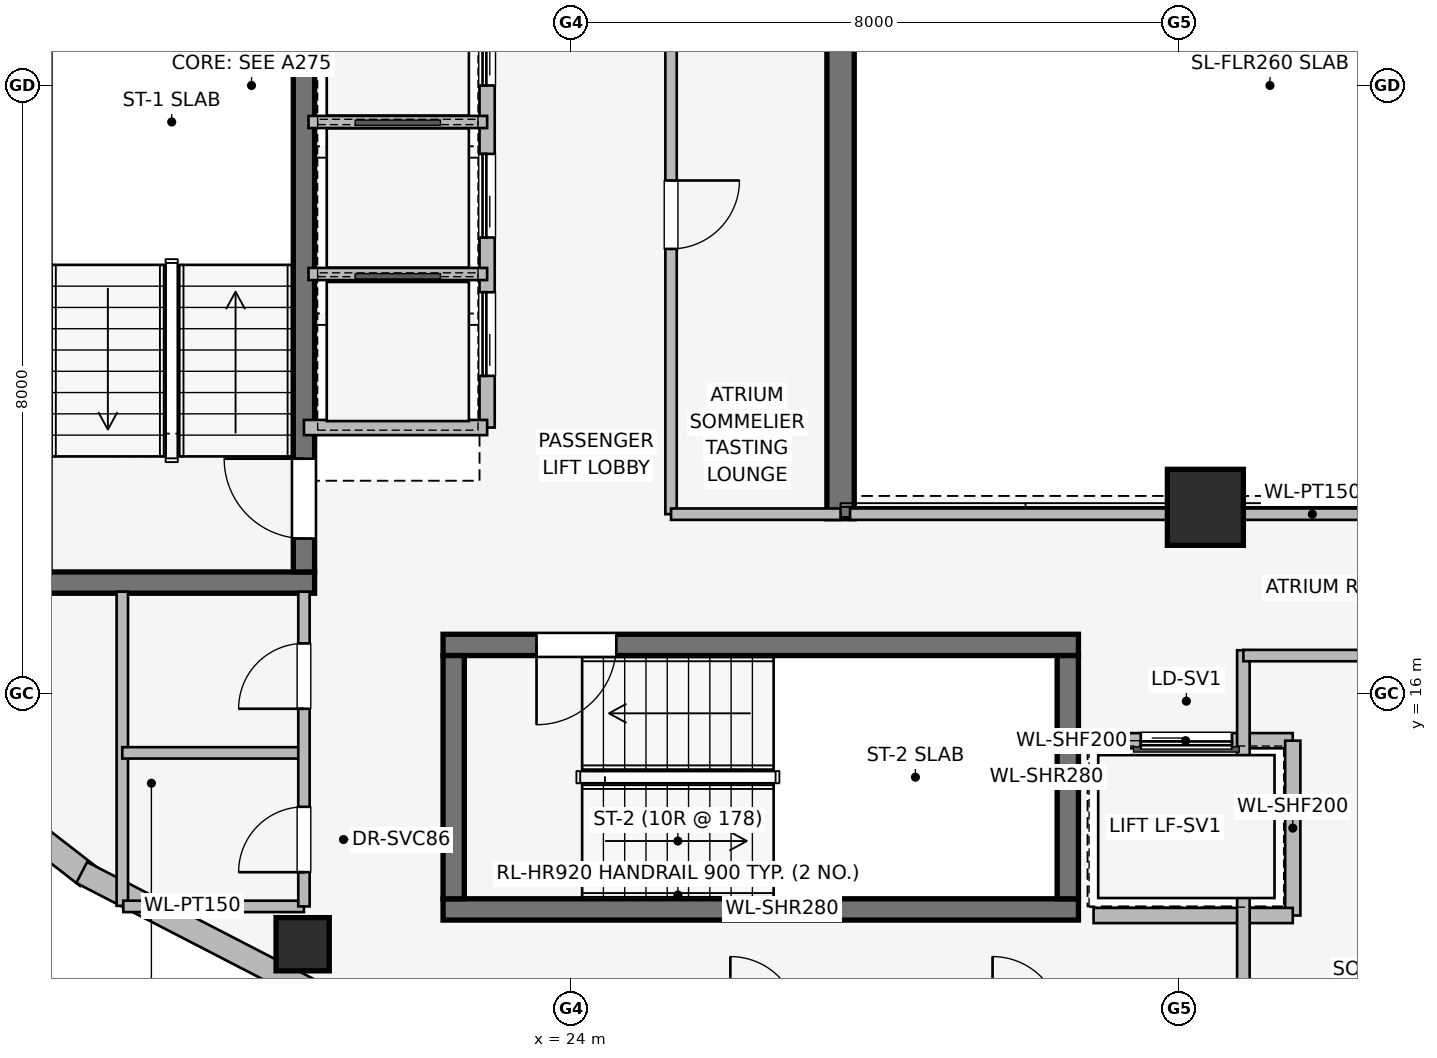
"""IFC4 building model, lengths in metres.
Left out: names, types, materials, properties, quantities, classifications, styles, units other than length and angle.
Written with IfcOpenShell. Run it as: python <this file> out.ifc"""

import sys

from ifc_helpers import new_model, si_unit, direction, frame, frame_2d, origin, origin_2d, place, context, subcontext, project, spatial, rectangle, extrude, element, fill, save


model = new_model("IFC4")
c1 = context("Model", 3, precision=1e-05, world=origin(), true_north=direction((0.0, 1.0)))
c2 = subcontext(c1, "Body", "Model", "MODEL_VIEW")
j1 = project(units=[si_unit("LENGTHUNIT", "METRE"), si_unit("PLANEANGLEUNIT", "RADIAN")], contexts=[c1])
p1 = place(None, origin())
s1 = spatial("IfcSite", under=j1, at=p1, CompositionType="ELEMENT")
p2 = place(p1, origin())
s2 = spatial("IfcBuilding", under=s1, at=p2, CompositionType="ELEMENT")
p3 = place(p2, frame((0.0, 0.0, 266.75)))
s3 = spatial("IfcBuildingStorey", under=s2, at=p3, CompositionType="ELEMENT", Elevation=266.75)
p4 = place(p3, frame((27.55, 29.55, 0.0), z_axis=(0.0, 0.0, 1.0), x_axis=(0.0, -1.0, 0.0)))
e1 = element("IfcWall", 1, at=p4, inside=s3, PredefinedType="SHEAR", context=c2, shape_type="SweptSolid", body=[
    extrude(rectangle(XDim=11.25, YDim=0.36, at=frame_2d((5.625, 0.0))), origin(), (0.0, 0.0, 1.0), 3.55),
])
p5 = place(p3, frame((16.87, 17.46, 0.0), z_axis=(0.0, 0.0, 1.0), x_axis=(1.0, 0.0, 0.0)))
e2 = element("IfcWall", 2, at=p5, inside=s3, PredefinedType="SHEAR", context=c2, shape_type="SweptSolid", body=[
    extrude(rectangle(XDim=3.76, YDim=0.28, at=frame_2d((1.88, 0.0))), origin(), (0.0, 0.0, 1.0), 3.55),
])
p6 = place(p3, frame((20.49, 17.6, 0.0), z_axis=(0.0, 0.0, 1.0), x_axis=(0.0, 1.0, 0.0)))
e3 = element("IfcWall", 3, at=p6, inside=s3, PredefinedType="SHEAR", context=c2, shape_type="SweptSolid", body=[
    extrude(rectangle(XDim=7.8, YDim=0.28, at=frame_2d((3.9, 0.0))), origin(), (0.0, 0.0, 1.0), 3.55),
])
p7 = place(p6, frame((0.44, 0.0, 0.0)))
e4 = element("IfcOpeningElement", 4, at=p7, cuts=e3, PredefinedType="OPENING", context=c2, shape_type="SweptSolid", body=[
    extrude(rectangle(XDim=1.05, YDim=2.0, at=frame_2d((0.525, 1.0))), frame((0.0, 0.15, 0.0), z_axis=(0.0, -1.0, 0.0), x_axis=(1.0, 0.0, 0.0)), (0.0, 0.0, 1.0), 0.3),
])
p8 = place(p3, frame((22.32, 13.16, 0.0), z_axis=(0.0, 0.0, 1.0), x_axis=(1.0, 0.0, 0.0)))
e5 = element("IfcWall", 5, at=p8, inside=s3, PredefinedType="SHEAR", context=c2, shape_type="SweptSolid", body=[
    extrude(rectangle(XDim=8.36, YDim=0.28, at=frame_2d((4.18, 0.0))), origin(), (0.0, 0.0, 1.0), 3.55),
])
p9 = place(p3, frame((30.68, 16.64, 0.0), z_axis=(0.0, 0.0, 1.0), x_axis=(-1.0, 0.0, 0.0)))
e6 = element("IfcWall", 6, at=p9, inside=s3, PredefinedType="SHEAR", context=c2, shape_type="SweptSolid", body=[
    extrude(rectangle(XDim=8.36, YDim=0.28, at=frame_2d((4.18, 0.0))), origin(), (0.0, 0.0, 1.0), 3.55),
])
p10 = place(p9, frame((6.08, 0.0, 0.0)))
e7 = element("IfcOpeningElement", 7, at=p10, cuts=e6, PredefinedType="OPENING", context=c2, shape_type="SweptSolid", body=[
    extrude(rectangle(XDim=1.05, YDim=2.0, at=frame_2d((0.525, 1.0))), frame((0.0, 0.15, 0.0), z_axis=(0.0, -1.0, 0.0), x_axis=(1.0, 0.0, 0.0)), (0.0, 0.0, 1.0), 0.3),
])
for number, where, z_axis, x_axis in (
    (8, (22.46, 16.5, 0.0), (0.0, 0.0, 1.0), (0.0, -1.0, 0.0)),
    (9, (30.54, 13.3, 0.0), (0.0, 0.0, 1.0), (0.0, 1.0, 0.0)),
):
    element("IfcWall", number, at=place(p3, frame(where, z_axis=z_axis, x_axis=x_axis)), inside=s3, PredefinedType="SHEAR", context=c2, shape_type="SweptSolid", body=[
        extrude(rectangle(XDim=3.2, YDim=0.28, at=frame_2d((1.6, 0.0))), origin(), (0.0, 0.0, 1.0), 3.55),
    ])
p11 = place(p3, frame((32.35, 18.45, 0.0), z_axis=(0.0, 0.0, 1.0), x_axis=(1.0, 0.0, 0.0)))
e10 = element("IfcColumn", 10, at=p11, inside=s3, PredefinedType="COLUMN", context=c2, shape_type="SweptSolid", body=[
    extrude(rectangle(XDim=1.0, YDim=1.0, at=origin_2d()), origin(), (0.0, 0.0, 1.0), 3.55),
])
p12 = place(p3, frame((20.473, 12.702, 0.0), z_axis=(0.0, 0.0, 1.0), x_axis=(1.0, 0.0, 0.0)))
e11 = element("IfcColumn", 11, at=p12, inside=s3, PredefinedType="COLUMN", context=c2, shape_type="SweptSolid", body=[
    extrude(rectangle(XDim=0.7, YDim=0.7, at=origin_2d()), origin(), (0.0, 0.0, 1.0), 3.55),
])
p13 = place(p3, frame((17.647, 13.599, 0.0), z_axis=(0.0, 0.0, 1.0), x_axis=(-0.790691856293, 0.61221433207, 0.0)))
e12 = element("IfcWall", 12, at=p13, inside=s3, PredefinedType="STANDARD", context=c2, shape_type="SweptSolid", body=[
    extrude(rectangle(XDim=1.676, YDim=0.33, at=frame_2d((0.838, 0.0))), origin(), (0.0, 0.0, 1.0), 3.24),
])
p14 = place(p3, frame((30.963, 6.73, 0.0), z_axis=(0.0, 0.0, 1.0), x_axis=(-0.888581481622, 0.458718814218, 0.0)))
e13 = element("IfcWall", 13, at=p14, inside=s3, PredefinedType="STANDARD", context=c2, shape_type="SweptSolid", body=[
    extrude(rectangle(XDim=15.077, YDim=0.31, at=frame_2d((7.539, 0.0))), origin(), (0.0, 0.0, 1.0), 3.24),
])
p15 = place(p14, frame((0.998, 0.0, 0.75)))
e14 = element("IfcOpeningElement", 14, at=p15, cuts=e13, PredefinedType="OPENING", context=c2, shape_type="SweptSolid", body=[
    extrude(rectangle(XDim=1.05, YDim=1.4, at=frame_2d((0.525, 0.7))), frame((0.0, 0.165, 0.0), z_axis=(0.0, -1.0, 0.0), x_axis=(1.0, 0.0, 0.0)), (0.0, 0.0, 1.0), 0.33),
])
p16 = place(p14, frame((4.176, 0.0, 0.75)))
e15 = element("IfcOpeningElement", 15, at=p16, cuts=e13, PredefinedType="OPENING", context=c2, shape_type="SweptSolid", body=[
    extrude(rectangle(XDim=1.05, YDim=1.4, at=frame_2d((0.525, 0.7))), frame((0.0, 0.165, 0.0), z_axis=(0.0, -1.0, 0.0), x_axis=(1.0, 0.0, 0.0)), (0.0, 0.0, 1.0), 0.33),
])
p17 = place(p14, frame((6.509, 0.0, 0.75)))
e16 = element("IfcOpeningElement", 16, at=p17, cuts=e13, PredefinedType="OPENING", context=c2, shape_type="SweptSolid", body=[
    extrude(rectangle(XDim=1.05, YDim=1.4, at=frame_2d((0.525, 0.7))), frame((0.0, 0.165, 0.0), z_axis=(0.0, -1.0, 0.0), x_axis=(1.0, 0.0, 0.0)), (0.0, 0.0, 1.0), 0.33),
])
p18 = place(p14, frame((8.842, 0.0, 0.75)))
e17 = element("IfcOpeningElement", 17, at=p18, cuts=e13, PredefinedType="OPENING", context=c2, shape_type="SweptSolid", body=[
    extrude(rectangle(XDim=1.05, YDim=1.4, at=frame_2d((0.525, 0.7))), frame((0.0, 0.165, 0.0), z_axis=(0.0, -1.0, 0.0), x_axis=(1.0, 0.0, 0.0)), (0.0, 0.0, 1.0), 0.33),
])
p19 = place(p3, frame((33.5, 15.38, 0.0), z_axis=(0.0, 0.0, 1.0), x_axis=(-1.0, 0.0, 0.0)))
e18 = element("IfcWall", 18, at=p19, inside=s3, PredefinedType="PARTITIONING", context=c2, shape_type="SweptSolid", body=[
    extrude(rectangle(XDim=2.82, YDim=0.2, at=frame_2d((1.41, 0.0))), origin(), (0.0, 0.0, 1.0), 3.24),
])
p20 = place(p19, frame((0.8, 0.0, 0.0)))
e19 = element("IfcOpeningElement", 19, at=p20, cuts=e18, PredefinedType="OPENING", context=c2, shape_type="SweptSolid", body=[
    extrude(rectangle(XDim=1.2, YDim=2.2, at=frame_2d((0.6, 1.1))), frame((0.0, 0.11, 0.0), z_axis=(0.0, -1.0, 0.0), x_axis=(1.0, 0.0, 0.0)), (0.0, 0.0, 1.0), 0.22),
])
p21 = place(p3, frame((33.5, 13.08, 0.0), z_axis=(0.0, 0.0, 1.0), x_axis=(0.0, 1.0, 0.0)))
e20 = element("IfcWall", 20, at=p21, inside=s3, PredefinedType="PARTITIONING", context=c2, shape_type="SweptSolid", body=[
    extrude(rectangle(XDim=2.3, YDim=0.2, at=frame_2d((1.15, 0.0))), origin(), (0.0, 0.0, 1.0), 3.24),
])
p22 = place(p3, frame((30.879, 13.08, 0.0), z_axis=(0.0, 0.0, 1.0), x_axis=(1.0, 0.0, 0.0)))
e21 = element("IfcWall", 21, at=p22, inside=s3, PredefinedType="PARTITIONING", context=c2, shape_type="SweptSolid", body=[
    extrude(rectangle(XDim=2.621, YDim=0.2, at=frame_2d((1.311, 0.0))), origin(), (0.0, 0.0, 1.0), 3.24),
])
p23 = place(p3, frame((22.9, 19.5, 0.0), z_axis=(0.0, 0.0, 1.0), x_axis=(0.0, 1.0, 0.0)))
e22 = element("IfcWall", 22, at=p23, inside=s3, PredefinedType="PARTITIONING", context=c2, shape_type="SweptSolid", body=[
    extrude(rectangle(XDim=6.085, YDim=0.2, at=frame_2d((3.042, 0.0))), origin(), (0.0, 0.0, 1.0), 3.24),
])
p24 = place(p23, frame((0.68, 0.0, 0.0)))
e23 = element("IfcOpeningElement", 23, at=p24, cuts=e22, PredefinedType="OPENING", context=c2, shape_type="SweptSolid", body=[
    extrude(rectangle(XDim=1.1, YDim=2.2, at=frame_2d((0.55, 1.1))), frame((0.0, 0.11, 0.0), z_axis=(0.0, -1.0, 0.0), x_axis=(1.0, 0.0, 0.0)), (0.0, 0.0, 1.0), 0.22),
])
p25 = place(p23, frame((2.5, 0.0, 0.0)))
e24 = element("IfcOpeningElement", 24, at=p25, cuts=e22, PredefinedType="OPENING", context=c2, shape_type="SweptSolid", body=[
    extrude(rectangle(XDim=1.1, YDim=2.2, at=frame_2d((0.55, 1.1))), frame((0.0, 0.11, 0.0), z_axis=(0.0, -1.0, 0.0), x_axis=(1.0, 0.0, 0.0)), (0.0, 0.0, 1.0), 0.22),
])
p26 = place(p23, frame((4.5, 0.0, 0.0)))
e25 = element("IfcOpeningElement", 25, at=p26, cuts=e22, PredefinedType="OPENING", context=c2, shape_type="SweptSolid", body=[
    extrude(rectangle(XDim=1.1, YDim=2.2, at=frame_2d((0.55, 1.1))), frame((0.0, 0.11, 0.0), z_axis=(0.0, -1.0, 0.0), x_axis=(1.0, 0.0, 0.0)), (0.0, 0.0, 1.0), 0.22),
])
p27 = place(p3, frame((20.49, 19.5, 0.0), z_axis=(0.0, 0.0, 1.0), x_axis=(1.0, 0.0, 0.0)))
e26 = element("IfcWall", 26, at=p27, inside=s3, PredefinedType="PARTITIONING", context=c2, shape_type="SweptSolid", body=[
    extrude(rectangle(XDim=2.41, YDim=0.2, at=frame_2d((1.205, 0.0))), origin(), (0.0, 0.0, 1.0), 2.14),
])
for number, where, z_axis, x_axis in (
    (27, (20.55, 21.52, 0.0), (0.0, 0.0, 1.0), (1.0, 0.0, 0.0)),
    (28, (20.55, 23.52, 0.0), (0.0, 0.0, 1.0), (1.0, 0.0, 0.0)),
):
    element("IfcWall", number, at=place(p3, frame(where, z_axis=z_axis, x_axis=x_axis)), inside=s3, PredefinedType="PARTITIONING", context=c2, shape_type="SweptSolid", body=[
        extrude(rectangle(XDim=2.35, YDim=0.16, at=frame_2d((1.175, 0.0))), origin(), (0.0, 0.0, 1.0), 3.24),
    ])
p28 = place(p3, frame((25.32, 29.55, 0.0), z_axis=(0.0, 0.0, 1.0), x_axis=(0.0, -1.0, 0.0)))
e29 = element("IfcWall", 29, at=p28, inside=s3, PredefinedType="PARTITIONING", context=c2, shape_type="SweptSolid", body=[
    extrude(rectangle(XDim=11.19, YDim=0.15, at=frame_2d((5.595, 0.0))), origin(), (0.0, 0.0, 1.0), 3.24),
])
p29 = place(p28, frame((1.35, 0.0, 0.0)))
e30 = element("IfcOpeningElement", 30, at=p29, cuts=e29, PredefinedType="OPENING", context=c2, shape_type="SweptSolid", body=[
    extrude(rectangle(XDim=0.86, YDim=2.0, at=frame_2d((0.43, 1.0))), frame((0.0, 0.085, 0.0), z_axis=(0.0, -1.0, 0.0), x_axis=(1.0, 0.0, 0.0)), (0.0, 0.0, 1.0), 0.17),
])
p30 = place(p28, frame((6.8, 0.0, 0.0)))
e31 = element("IfcOpeningElement", 31, at=p30, cuts=e29, PredefinedType="OPENING", context=c2, shape_type="SweptSolid", body=[
    extrude(rectangle(XDim=0.9, YDim=2.0, at=frame_2d((0.45, 1.0))), frame((0.0, 0.085, 0.0), z_axis=(0.0, -1.0, 0.0), x_axis=(1.0, 0.0, 0.0)), (0.0, 0.0, 1.0), 0.17),
])
p31 = place(p3, frame((25.32, 18.36, 0.0), z_axis=(0.0, 0.0, 1.0), x_axis=(1.0, 0.0, 0.0)))
e32 = element("IfcWall", 32, at=p31, inside=s3, PredefinedType="PARTITIONING", context=c2, shape_type="SweptSolid", body=[
    extrude(rectangle(XDim=2.23, YDim=0.15, at=frame_2d((1.115, 0.0))), origin(), (0.0, 0.0, 1.0), 3.24),
])
p32 = place(p3, frame((18.1, 17.34, 0.0), z_axis=(0.0, 0.0, 1.0), x_axis=(0.0, -1.0, 0.0)))
e33 = element("IfcWall", 33, at=p32, inside=s3, PredefinedType="PARTITIONING", context=c2, shape_type="SweptSolid", body=[
    extrude(rectangle(XDim=4.133, YDim=0.15, at=frame_2d((2.066, 0.0))), origin(), (0.0, 0.0, 1.0), 3.24),
])
p33 = place(p3, frame((18.113, 13.2, 0.0), z_axis=(0.0, 0.0, 1.0), x_axis=(1.0, 0.0, 0.0)))
e34 = element("IfcWall", 34, at=p33, inside=s3, PredefinedType="PARTITIONING", context=c2, shape_type="SweptSolid", body=[
    extrude(rectangle(XDim=2.377, YDim=0.15, at=frame_2d((1.188, 0.0))), origin(), (0.0, 0.0, 1.0), 3.24),
])
p34 = place(p3, frame((18.1, 15.22, 0.0), z_axis=(0.0, 0.0, 1.0), x_axis=(1.0, 0.0, 0.0)))
e35 = element("IfcWall", 35, at=p34, inside=s3, PredefinedType="PARTITIONING", context=c2, shape_type="SweptSolid", body=[
    extrude(rectangle(XDim=2.39, YDim=0.15, at=frame_2d((1.195, 0.0))), origin(), (0.0, 0.0, 1.0), 3.24),
])
p35 = place(p3, frame((20.49, 13.2, 0.0), z_axis=(0.0, 0.0, 1.0), x_axis=(0.0, 1.0, 0.0)))
e36 = element("IfcWall", 36, at=p35, inside=s3, PredefinedType="PARTITIONING", context=c2, shape_type="SweptSolid", body=[
    extrude(rectangle(XDim=4.14, YDim=0.15, at=frame_2d((2.07, 0.0))), origin(), (0.0, 0.0, 1.0), 3.24),
])
p36 = place(p35, frame((0.45, 0.0, 0.0)))
e37 = element("IfcOpeningElement", 37, at=p36, cuts=e36, PredefinedType="OPENING", context=c2, shape_type="SweptSolid", body=[
    extrude(rectangle(XDim=0.86, YDim=2.0, at=frame_2d((0.43, 1.0))), frame((0.0, 0.085, 0.0), z_axis=(0.0, -1.0, 0.0), x_axis=(1.0, 0.0, 0.0)), (0.0, 0.0, 1.0), 0.17),
])
p37 = place(p35, frame((2.6, 0.0, 0.0)))
e38 = element("IfcOpeningElement", 38, at=p37, cuts=e36, PredefinedType="OPENING", context=c2, shape_type="SweptSolid", body=[
    extrude(rectangle(XDim=0.86, YDim=2.0, at=frame_2d((0.43, 1.0))), frame((0.0, 0.085, 0.0), z_axis=(0.0, -1.0, 0.0), x_axis=(1.0, 0.0, 0.0)), (0.0, 0.0, 1.0), 0.17),
])
p38 = place(p3, frame((27.675, 18.36, 0.0), z_axis=(0.0, 0.0, 1.0), x_axis=(1.0, 0.0, 0.0)))
e39 = element("IfcWall", 39, at=p38, inside=s3, PredefinedType="PARTITIONING", context=c2, shape_type="SweptSolid", body=[
    extrude(rectangle(XDim=12.165, YDim=0.15, at=frame_2d((6.083, 0.0))), origin(), (0.0, 0.0, 1.0), 2.381),
])
p39 = place(p3, frame((32.85, 6.154, 0.0), z_axis=(0.0, 0.0, 1.0), x_axis=(0.0, 1.0, 0.0)))
e40 = element("IfcWall", 40, at=p39, inside=s3, PredefinedType="PARTITIONING", context=c2, shape_type="SweptSolid", body=[
    extrude(rectangle(XDim=10.416, YDim=0.165, at=frame_2d((5.208, 0.0))), origin(), (0.0, 0.0, 1.0), 3.24),
])
p40 = place(p3, frame((32.85, 16.5, 0.0), z_axis=(0.0, 0.0, 1.0), x_axis=(1.0, 0.0, 0.0)))
e41 = element("IfcWall", 41, at=p40, inside=s3, PredefinedType="PARTITIONING", context=c2, shape_type="SweptSolid", body=[
    extrude(rectangle(XDim=8.61, YDim=0.15, at=frame_2d((4.305, 0.0))), origin(), (0.0, 0.0, 1.0), 3.24),
])
p41 = place(p40, frame((3.825, 0.0, 0.0)))
e42 = element("IfcOpeningElement", 42, at=p41, cuts=e41, PredefinedType="OPENING", context=c2, shape_type="SweptSolid", body=[
    extrude(rectangle(XDim=0.96, YDim=2.0, at=frame_2d((0.48, 1.0))), frame((0.0, 0.085, 0.0), z_axis=(0.0, -1.0, 0.0), x_axis=(1.0, 0.0, 0.0)), (0.0, 0.0, 1.0), 0.17),
])
p42 = place(p7, origin())
e43 = element("IfcDoor", 43, at=p42, inside=s3, OperationType="SINGLE_SWING_RIGHT", PredefinedType="DOOR", context=c2, shape_type="SweptSolid", body=[
    extrude(rectangle(XDim=1.05, YDim=2.0, at=frame_2d((0.525, 1.0))), frame((0.0, 0.025, 0.0), z_axis=(0.0, -1.0, 0.0), x_axis=(1.0, 0.0, 0.0)), (0.0, 0.0, 1.0), 0.05),
])
fill(e4, e43)
p43 = place(p10, origin())
e44 = element("IfcDoor", 44, at=p43, inside=s3, OperationType="SINGLE_SWING_RIGHT", PredefinedType="DOOR", context=c2, shape_type="SweptSolid", body=[
    extrude(rectangle(XDim=1.05, YDim=2.0, at=frame_2d((0.525, 1.0))), frame((0.0, 0.025, 0.0), z_axis=(0.0, -1.0, 0.0), x_axis=(1.0, 0.0, 0.0)), (0.0, 0.0, 1.0), 0.05),
])
fill(e7, e44)
p44 = place(p20, origin())
e45 = element("IfcDoor", 45, at=p44, inside=s3, OperationType="SLIDING_TO_RIGHT", PredefinedType="DOOR", context=c2, shape_type="SweptSolid", body=[
    extrude(rectangle(XDim=1.2, YDim=2.2, at=frame_2d((0.6, 1.1))), frame((0.0, 0.025, 0.0), z_axis=(0.0, -1.0, 0.0), x_axis=(1.0, 0.0, 0.0)), (0.0, 0.0, 1.0), 0.05),
])
fill(e19, e45)
p45 = place(p24, origin())
e46 = element("IfcDoor", 46, at=p45, inside=s3, OperationType="SLIDING_TO_LEFT", PredefinedType="DOOR", context=c2, shape_type="SweptSolid", body=[
    extrude(rectangle(XDim=1.1, YDim=2.2, at=frame_2d((0.55, 1.1))), frame((0.0, 0.025, 0.0), z_axis=(0.0, -1.0, 0.0), x_axis=(1.0, 0.0, 0.0)), (0.0, 0.0, 1.0), 0.05),
])
fill(e23, e46)
p46 = place(p25, origin())
e47 = element("IfcDoor", 47, at=p46, inside=s3, OperationType="SLIDING_TO_LEFT", PredefinedType="DOOR", context=c2, shape_type="SweptSolid", body=[
    extrude(rectangle(XDim=1.1, YDim=2.2, at=frame_2d((0.55, 1.1))), frame((0.0, 0.025, 0.0), z_axis=(0.0, -1.0, 0.0), x_axis=(1.0, 0.0, 0.0)), (0.0, 0.0, 1.0), 0.05),
])
fill(e24, e47)
p47 = place(p26, origin())
e48 = element("IfcDoor", 48, at=p47, inside=s3, OperationType="SLIDING_TO_LEFT", PredefinedType="DOOR", context=c2, shape_type="SweptSolid", body=[
    extrude(rectangle(XDim=1.1, YDim=2.2, at=frame_2d((0.55, 1.1))), frame((0.0, 0.025, 0.0), z_axis=(0.0, -1.0, 0.0), x_axis=(1.0, 0.0, 0.0)), (0.0, 0.0, 1.0), 0.05),
])
fill(e25, e48)
p48 = place(p30, origin())
e49 = element("IfcDoor", 49, at=p48, inside=s3, OperationType="SINGLE_SWING_LEFT", PredefinedType="DOOR", context=c2, shape_type="SweptSolid", body=[
    extrude(rectangle(XDim=0.9, YDim=2.0, at=frame_2d((0.45, 1.0))), frame((0.0, 0.025, 0.0), z_axis=(0.0, -1.0, 0.0), x_axis=(1.0, 0.0, 0.0)), (0.0, 0.0, 1.0), 0.05),
])
fill(e31, e49)
p49 = place(p36, origin())
e50 = element("IfcDoor", 50, at=p49, inside=s3, OperationType="SINGLE_SWING_LEFT", PredefinedType="DOOR", context=c2, shape_type="SweptSolid", body=[
    extrude(rectangle(XDim=0.86, YDim=2.0, at=frame_2d((0.43, 1.0))), frame((0.0, 0.025, 0.0), z_axis=(0.0, -1.0, 0.0), x_axis=(1.0, 0.0, 0.0)), (0.0, 0.0, 1.0), 0.05),
])
fill(e37, e50)
p50 = place(p37, origin())
e51 = element("IfcDoor", 51, at=p50, inside=s3, OperationType="SINGLE_SWING_LEFT", PredefinedType="DOOR", context=c2, shape_type="SweptSolid", body=[
    extrude(rectangle(XDim=0.86, YDim=2.0, at=frame_2d((0.43, 1.0))), frame((0.0, 0.025, 0.0), z_axis=(0.0, -1.0, 0.0), x_axis=(1.0, 0.0, 0.0)), (0.0, 0.0, 1.0), 0.05),
])
fill(e38, e51)
save(model, sys.argv[1])
